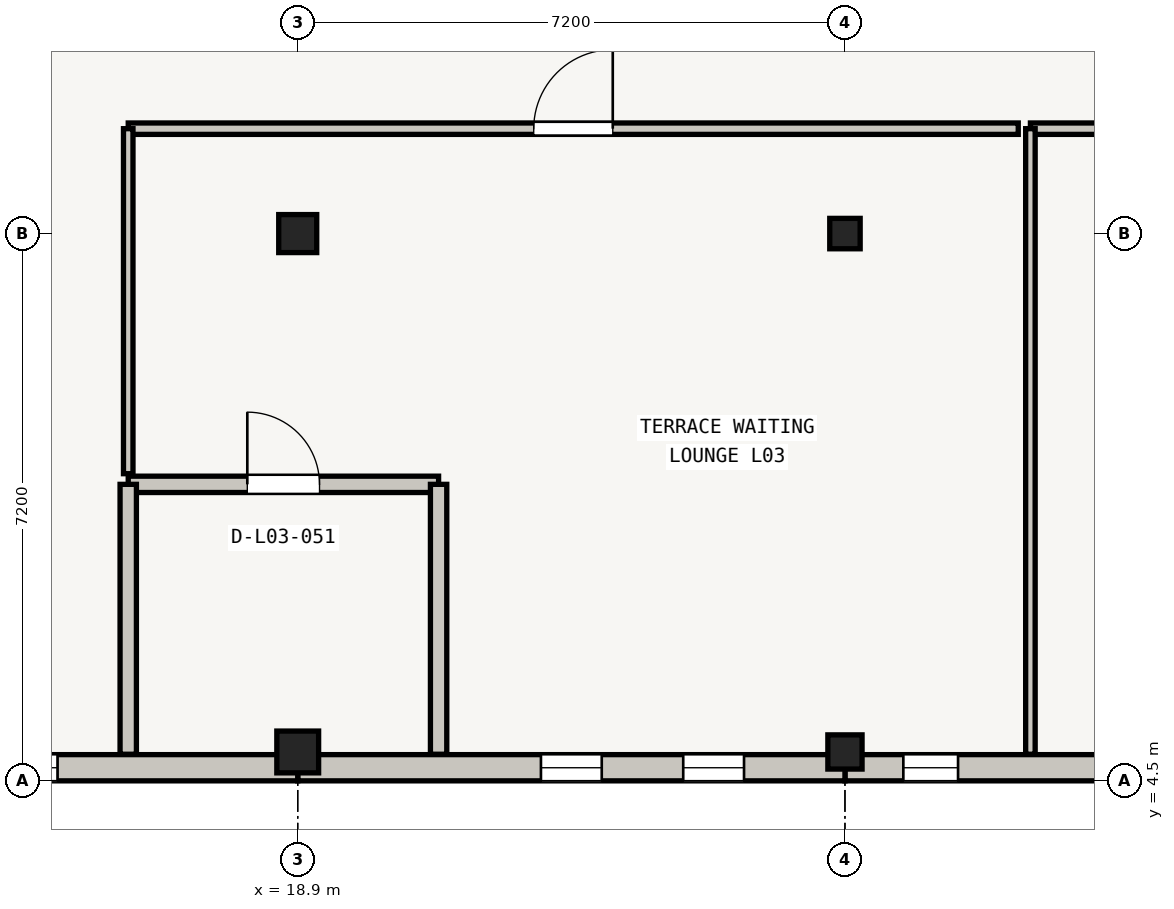
"""IFC4 building model, lengths in metres.
Left out: names, types, materials, properties, quantities, classifications, styles, units other than length and angle.
Written with IfcOpenShell. Run it as: python <this file> out.ifc"""

import sys

from ifc_helpers import new_model, si_unit, direction, frame, frame_2d, origin, origin_2d, place, context, subcontext, project, spatial, rectangle, extrude, element, fill, save


model = new_model("IFC4")
c1 = context("Model", 3, precision=1e-05, world=origin(), true_north=direction((0.0, 1.0)))
c2 = subcontext(c1, "Body", "Model", "MODEL_VIEW")
j1 = project(units=[si_unit("LENGTHUNIT", "METRE"), si_unit("PLANEANGLEUNIT", "RADIAN")], contexts=[c1])
p1 = place(None, origin())
s1 = spatial("IfcSite", under=j1, at=p1, CompositionType="ELEMENT")
p2 = place(p1, origin())
s2 = spatial("IfcBuilding", under=s1, at=p2, CompositionType="ELEMENT")
p3 = place(p2, frame((0.0, 0.0, 12.9)))
s3 = spatial("IfcBuildingStorey", under=s2, at=p3, CompositionType="ELEMENT", Elevation=12.9)
p4 = place(p3, frame((18.9, 4.88, 0.0), z_axis=(0.0, 0.0, 1.0), x_axis=(1.0, 0.0, 0.0)))
e1 = element("IfcColumn", 1, at=p4, inside=s3, PredefinedType="COLUMN", context=c2, shape_type="SweptSolid", body=[
    extrude(rectangle(XDim=0.55, YDim=0.55, at=origin_2d()), origin(), (0.0, 0.0, 1.0), 3.92),
])
p5 = place(p3, frame((18.9, 11.7, 0.0), z_axis=(0.0, 0.0, 1.0), x_axis=(1.0, 0.0, 0.0)))
e2 = element("IfcColumn", 2, at=p5, inside=s3, PredefinedType="COLUMN", context=c2, shape_type="SweptSolid", body=[
    extrude(rectangle(XDim=0.5, YDim=0.5, at=origin_2d()), origin(), (0.0, 0.0, 1.0), 3.92),
])
p6 = place(p3, frame((26.1, 4.88, 0.0), z_axis=(0.0, 0.0, 1.0), x_axis=(1.0, 0.0, 0.0)))
e3 = element("IfcColumn", 3, at=p6, inside=s3, PredefinedType="COLUMN", context=c2, shape_type="SweptSolid", body=[
    extrude(rectangle(XDim=0.45, YDim=0.45, at=origin_2d()), origin(), (0.0, 0.0, 1.0), 3.92),
])
p7 = place(p3, frame((26.1, 11.7, 0.0), z_axis=(0.0, 0.0, 1.0), x_axis=(1.0, 0.0, 0.0)))
e4 = element("IfcColumn", 4, at=p7, inside=s3, PredefinedType="COLUMN", context=c2, shape_type="SweptSolid", body=[
    extrude(rectangle(XDim=0.4, YDim=0.4, at=origin_2d()), origin(), (0.0, 0.0, 1.0), 3.92),
])
p8 = place(p3, frame((33.3, 4.673, 0.0), z_axis=(0.0, 0.0, 1.0), x_axis=(-1.0, 0.0, 0.0)))
e5 = element("IfcWall", 5, at=p8, inside=s3, PredefinedType="SOLIDWALL", context=c2, shape_type="SweptSolid", body=[
    extrude(rectangle(XDim=7.2, YDim=0.345, at=frame_2d((3.6, 0.0))), origin(), (0.0, 0.0, 1.0), 3.185),
])
p9 = place(p8, frame((1.368, 0.0, 0.55)))
e6 = element("IfcOpeningElement", 6, at=p9, cuts=e5, PredefinedType="OPENING", context=c2, shape_type="SweptSolid", body=[
    extrude(rectangle(XDim=0.72, YDim=1.85, at=frame_2d((0.36, 0.925))), frame((0.0, 0.172, 0.0), z_axis=(0.0, -1.0, 0.0), x_axis=(1.0, 0.0, 0.0)), (0.0, 0.0, 1.0), 0.345),
])
p10 = place(p8, frame((2.49, 0.0, 0.55)))
e7 = element("IfcOpeningElement", 7, at=p10, cuts=e5, PredefinedType="OPENING", context=c2, shape_type="SweptSolid", body=[
    extrude(rectangle(XDim=0.72, YDim=1.85, at=frame_2d((0.36, 0.925))), frame((0.0, 0.172, 0.0), z_axis=(0.0, -1.0, 0.0), x_axis=(1.0, 0.0, 0.0)), (0.0, 0.0, 1.0), 0.345),
])
p11 = place(p8, frame((5.712, 0.0, 0.55)))
e8 = element("IfcOpeningElement", 8, at=p11, cuts=e5, PredefinedType="OPENING", context=c2, shape_type="SweptSolid", body=[
    extrude(rectangle(XDim=0.72, YDim=1.85, at=frame_2d((0.36, 0.925))), frame((0.0, 0.172, 0.0), z_axis=(0.0, -1.0, 0.0), x_axis=(1.0, 0.0, 0.0)), (0.0, 0.0, 1.0), 0.345),
])
p12 = place(p3, frame((26.1, 4.673, 0.0), z_axis=(0.0, 0.0, 1.0), x_axis=(-1.0, 0.0, 0.0)))
e9 = element("IfcWall", 9, at=p12, inside=s3, PredefinedType="SOLIDWALL", context=c2, shape_type="SweptSolid", body=[
    extrude(rectangle(XDim=7.2, YDim=0.345, at=frame_2d((3.6, 0.0))), origin(), (0.0, 0.0, 1.0), 2.955),
])
p13 = place(p12, frame((1.328, 0.0, 0.55)))
e10 = element("IfcOpeningElement", 10, at=p13, cuts=e9, PredefinedType="OPENING", context=c2, shape_type="SweptSolid", body=[
    extrude(rectangle(XDim=0.8, YDim=1.8, at=frame_2d((0.4, 0.9))), frame((0.0, 0.172, 0.0), z_axis=(0.0, -1.0, 0.0), x_axis=(1.0, 0.0, 0.0)), (0.0, 0.0, 1.0), 0.345),
])
p14 = place(p12, frame((3.2, 0.0, 0.55)))
e11 = element("IfcOpeningElement", 11, at=p14, cuts=e9, PredefinedType="OPENING", context=c2, shape_type="SweptSolid", body=[
    extrude(rectangle(XDim=0.8, YDim=1.8, at=frame_2d((0.4, 0.9))), frame((0.0, 0.172, 0.0), z_axis=(0.0, -1.0, 0.0), x_axis=(1.0, 0.0, 0.0)), (0.0, 0.0, 1.0), 0.345),
])
p15 = place(p3, frame((18.9, 4.673, 0.0), z_axis=(0.0, 0.0, 1.0), x_axis=(-1.0, 0.0, 0.0)))
e12 = element("IfcWall", 12, at=p15, inside=s3, PredefinedType="SOLIDWALL", context=c2, shape_type="SweptSolid", body=[
    extrude(rectangle(XDim=7.2, YDim=0.345, at=frame_2d((3.6, 0.0))), origin(), (0.0, 0.0, 1.0), 2.955),
])
p16 = place(p15, frame((3.16, 0.0, 0.55)))
e13 = element("IfcOpeningElement", 13, at=p16, cuts=e12, PredefinedType="OPENING", context=c2, shape_type="SweptSolid", body=[
    extrude(rectangle(XDim=0.88, YDim=1.8, at=frame_2d((0.44, 0.9))), frame((0.0, 0.172, 0.0), z_axis=(0.0, -1.0, 0.0), x_axis=(1.0, 0.0, 0.0)), (0.0, 0.0, 1.0), 0.345),
])
p17 = place(p3, frame((16.67, 8.401, 0.0), z_axis=(0.0, 0.0, 1.0), x_axis=(1.0, 0.0, 0.0)))
e14 = element("IfcWall", 14, at=p17, inside=s3, PredefinedType="PLUMBINGWALL", context=c2, shape_type="SweptSolid", body=[
    extrude(rectangle(XDim=4.083, YDim=0.215, at=frame_2d((2.042, 0.0))), origin(), (0.0, 0.0, 1.0), 2.94),
])
p18 = place(p17, frame((1.567, 0.0, 0.0)))
e15 = element("IfcOpeningElement", 15, at=p18, cuts=e14, PredefinedType="OPENING", context=c2, shape_type="SweptSolid", body=[
    extrude(rectangle(XDim=0.95, YDim=2.05, at=frame_2d((0.475, 1.025))), frame((0.0, 0.107, 0.0), z_axis=(0.0, -1.0, 0.0), x_axis=(1.0, 0.0, 0.0)), (0.0, 0.0, 1.0), 0.215),
])
for number, where, z_axis, x_axis in (
    (16, (20.753, 8.401, 0.0), (0.0, 0.0, 1.0), (0.0, -1.0, 0.0)),
    (17, (16.67, 4.85, 0.0), (0.0, 0.0, 1.0), (0.0, 1.0, 0.0)),
):
    element("IfcWall", number, at=place(p3, frame(where, z_axis=z_axis, x_axis=x_axis)), inside=s3, PredefinedType="PLUMBINGWALL", context=c2, shape_type="SweptSolid", body=[
        extrude(rectangle(XDim=3.551, YDim=0.215, at=frame_2d((1.775, 0.0))), origin(), (0.0, 0.0, 1.0), 2.94),
    ])
p19 = place(p3, frame((28.54, 13.08, 0.0), z_axis=(0.0, 0.0, 1.0), x_axis=(1.0, 0.0, 0.0)))
e18 = element("IfcWall", 18, at=p19, inside=s3, PredefinedType="PARTITIONING", context=c2, shape_type="SweptSolid", body=[
    extrude(rectangle(XDim=11.71, YDim=0.15, at=frame_2d((5.855, 0.0))), origin(), (0.0, 0.0, 1.0), 2.94),
])
p20 = place(p19, frame((5.355, 0.0, 0.0)))
e19 = element("IfcOpeningElement", 19, at=p20, cuts=e18, PredefinedType="OPENING", context=c2, shape_type="SweptSolid", body=[
    extrude(rectangle(XDim=1.0, YDim=2.05, at=frame_2d((0.5, 1.025))), frame((0.0, 0.075, 0.0), z_axis=(0.0, -1.0, 0.0), x_axis=(1.0, 0.0, 0.0)), (0.0, 0.0, 1.0), 0.15),
])
p21 = place(p3, frame((28.54, 4.85, 0.0), z_axis=(0.0, 0.0, 1.0), x_axis=(0.0, 1.0, 0.0)))
e20 = element("IfcWall", 20, at=p21, inside=s3, PredefinedType="PARTITIONING", context=c2, shape_type="SweptSolid", body=[
    extrude(rectangle(XDim=8.23, YDim=0.125, at=frame_2d((4.115, 0.0))), origin(), (0.0, 0.0, 1.0), 2.94),
])
p22 = place(p3, frame((16.67, 13.08, 0.0), z_axis=(0.0, 0.0, 1.0), x_axis=(1.0, 0.0, 0.0)))
e21 = element("IfcWall", 21, at=p22, inside=s3, PredefinedType="PARTITIONING", context=c2, shape_type="SweptSolid", body=[
    extrude(rectangle(XDim=11.71, YDim=0.15, at=frame_2d((5.855, 0.0))), origin(), (0.0, 0.0, 1.0), 2.94),
])
p23 = place(p22, frame((5.335, 0.0, 0.0)))
e22 = element("IfcOpeningElement", 22, at=p23, cuts=e21, PredefinedType="OPENING", context=c2, shape_type="SweptSolid", body=[
    extrude(rectangle(XDim=1.04, YDim=2.05, at=frame_2d((0.52, 1.025))), frame((0.0, 0.075, 0.0), z_axis=(0.0, -1.0, 0.0), x_axis=(1.0, 0.0, 0.0)), (0.0, 0.0, 1.0), 0.15),
])
p24 = place(p3, frame((16.67, 8.541, 0.0), z_axis=(0.0, 0.0, 1.0), x_axis=(0.0, 1.0, 0.0)))
e23 = element("IfcWall", 23, at=p24, inside=s3, PredefinedType="PARTITIONING", context=c2, shape_type="SweptSolid", body=[
    extrude(rectangle(XDim=4.539, YDim=0.125, at=frame_2d((2.27, 0.0))), origin(), (0.0, 0.0, 1.0), 2.94),
])
p25 = place(p11, origin())
e24 = element("IfcWindow", 24, at=p25, inside=s3, PartitioningType="SINGLE_PANEL", PredefinedType="WINDOW", context=c2, shape_type="SweptSolid", body=[
    extrude(rectangle(XDim=0.72, YDim=1.85, at=frame_2d((0.36, 0.925))), frame((0.0, 0.03, 0.0), z_axis=(0.0, -1.0, 0.0), x_axis=(1.0, 0.0, 0.0)), (0.0, 0.0, 1.0), 0.06),
])
fill(e8, e24)
p26 = place(p13, origin())
e25 = element("IfcWindow", 25, at=p26, inside=s3, PartitioningType="SINGLE_PANEL", PredefinedType="WINDOW", context=c2, shape_type="SweptSolid", body=[
    extrude(rectangle(XDim=0.8, YDim=1.8, at=frame_2d((0.4, 0.9))), frame((0.0, 0.03, 0.0), z_axis=(0.0, -1.0, 0.0), x_axis=(1.0, 0.0, 0.0)), (0.0, 0.0, 1.0), 0.06),
])
fill(e10, e25)
p27 = place(p14, origin())
e26 = element("IfcWindow", 26, at=p27, inside=s3, PartitioningType="SINGLE_PANEL", PredefinedType="WINDOW", context=c2, shape_type="SweptSolid", body=[
    extrude(rectangle(XDim=0.8, YDim=1.8, at=frame_2d((0.4, 0.9))), frame((0.0, 0.03, 0.0), z_axis=(0.0, -1.0, 0.0), x_axis=(1.0, 0.0, 0.0)), (0.0, 0.0, 1.0), 0.06),
])
fill(e11, e26)
p28 = place(p16, origin())
e27 = element("IfcWindow", 27, at=p28, inside=s3, PartitioningType="SINGLE_PANEL", PredefinedType="WINDOW", context=c2, shape_type="SweptSolid", body=[
    extrude(rectangle(XDim=0.88, YDim=1.8, at=frame_2d((0.44, 0.9))), frame((0.0, 0.03, 0.0), z_axis=(0.0, -1.0, 0.0), x_axis=(1.0, 0.0, 0.0)), (0.0, 0.0, 1.0), 0.06),
])
fill(e13, e27)
p29 = place(p18, origin())
e28 = element("IfcDoor", 28, at=p29, inside=s3, OperationType="SINGLE_SWING_LEFT", PredefinedType="DOOR", context=c2, shape_type="SweptSolid", body=[
    extrude(rectangle(XDim=0.95, YDim=2.05, at=frame_2d((0.475, 1.025))), frame((0.0, 0.025, 0.0), z_axis=(0.0, -1.0, 0.0), x_axis=(1.0, 0.0, 0.0)), (0.0, 0.0, 1.0), 0.05),
])
fill(e15, e28)
p30 = place(p23, origin())
e29 = element("IfcDoor", 29, at=p30, inside=s3, OperationType="SINGLE_SWING_RIGHT", PredefinedType="DOOR", context=c2, shape_type="SweptSolid", body=[
    extrude(rectangle(XDim=1.04, YDim=2.05, at=frame_2d((0.52, 1.025))), frame((0.0, 0.025, 0.0), z_axis=(0.0, -1.0, 0.0), x_axis=(1.0, 0.0, 0.0)), (0.0, 0.0, 1.0), 0.05),
])
fill(e22, e29)
save(model, sys.argv[1])
